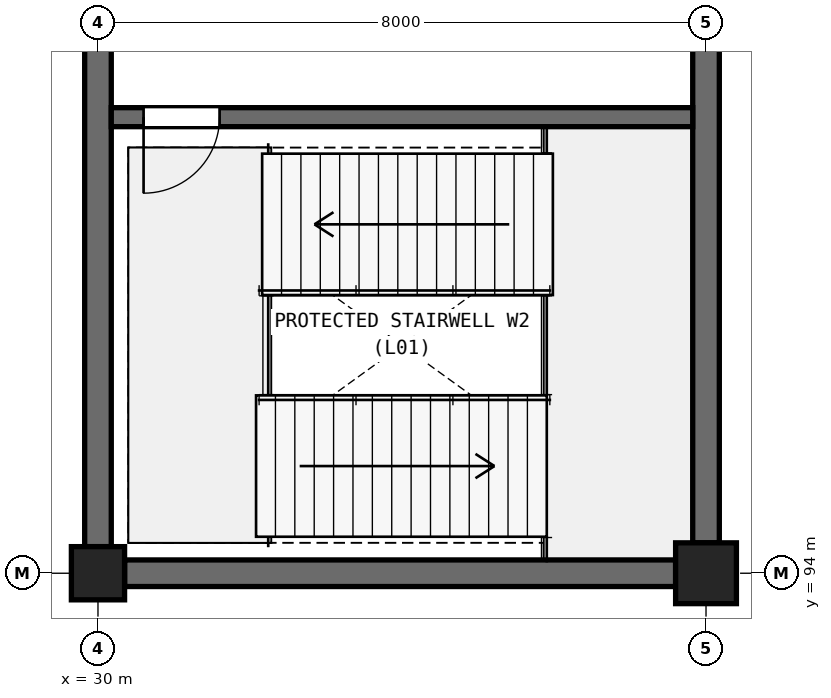
"""IFC4 building model, lengths in metres.
Left out: names, types, materials, properties, quantities, classifications, styles, units other than length and angle.
Written with IfcOpenShell. Run it as: python <this file> out.ifc"""

import sys

from ifc_helpers import new_model, si_unit, direction, frame, frame_2d, origin, origin_2d, place, context, subcontext, project, spatial, rectangle, extrude, element, fill, save


model = new_model("IFC4")
c1 = context("Model", 3, precision=1e-05, world=origin(), true_north=direction((0.0, 1.0)))
c2 = subcontext(c1, "Body", "Model", "MODEL_VIEW")
j1 = project(units=[si_unit("LENGTHUNIT", "METRE"), si_unit("PLANEANGLEUNIT", "RADIAN")], contexts=[c1])
p1 = place(None, origin())
s1 = spatial("IfcSite", under=j1, at=p1, CompositionType="ELEMENT")
p2 = place(p1, origin())
s2 = spatial("IfcBuilding", under=s1, at=p2, CompositionType="ELEMENT")
p3 = place(p2, frame((0.0, 0.0, 5.4)))
s3 = spatial("IfcBuildingStorey", under=s2, at=p3, CompositionType="ELEMENT", Elevation=5.4)
p4 = place(p3, frame((30.0, 94.0, 0.0), z_axis=(0.0, 0.0, 1.0), x_axis=(1.0, 0.0, 0.0)))
e1 = element("IfcColumn", 1, at=p4, inside=s3, PredefinedType="COLUMN", context=c2, shape_type="SweptSolid", body=[
    extrude(rectangle(XDim=0.7, YDim=0.7, at=origin_2d()), origin(), (0.0, 0.0, 1.0), 5.4),
])
p5 = place(p3, frame((38.0, 94.0, 0.0), z_axis=(0.0, 0.0, 1.0), x_axis=(1.0, 0.0, 0.0)))
e2 = element("IfcColumn", 2, at=p5, inside=s3, PredefinedType="COLUMN", context=c2, shape_type="SweptSolid", body=[
    extrude(rectangle(XDim=0.8, YDim=0.8, at=origin_2d()), origin(), (0.0, 0.0, 1.0), 5.4),
])
for number, where, z_axis, x_axis in (
    (3, (30.35, 94.0, 0.0), (0.0, 0.0, 1.0), (1.0, 0.0, 0.0)),
    (4, (30.0, 94.35, 0.0), (0.0, 0.0, 1.0), (0.0, 1.0, 0.0)),
):
    element("IfcWall", number, at=place(p3, frame(where, z_axis=z_axis, x_axis=x_axis)), inside=s3, PredefinedType="SHEAR", context=c2, shape_type="SweptSolid", body=[
        extrude(rectangle(XDim=7.25, YDim=0.35, at=frame_2d((3.625, 0.0))), origin(), (0.0, 0.0, 1.0), 5.18),
    ])
p6 = place(p3, frame((38.0, 94.4, 0.0), z_axis=(0.0, 0.0, 1.0), x_axis=(0.0, 1.0, 0.0)))
e5 = element("IfcWall", 5, at=p6, inside=s3, PredefinedType="SHEAR", context=c2, shape_type="SweptSolid", body=[
    extrude(rectangle(XDim=7.225, YDim=0.35, at=frame_2d((3.613, 0.0))), origin(), (0.0, 0.0, 1.0), 5.18),
])
p7 = place(p3, frame((30.175, 100.0, 0.0), z_axis=(0.0, 0.0, 1.0), x_axis=(1.0, 0.0, 0.0)))
e6 = element("IfcWall", 6, at=p7, inside=s3, PredefinedType="SOLIDWALL", context=c2, shape_type="SweptSolid", body=[
    extrude(rectangle(XDim=7.65, YDim=0.25, at=frame_2d((3.825, 0.0))), origin(), (0.0, 0.0, 1.0), 5.18),
])
p8 = place(p7, frame((0.425, 0.0, 0.0)))
e7 = element("IfcOpeningElement", 7, at=p8, cuts=e6, PredefinedType="OPENING", context=c2, shape_type="SweptSolid", body=[
    extrude(rectangle(XDim=1.0, YDim=2.2, at=frame_2d((0.5, 1.1))), frame((0.0, 0.135, 0.0), z_axis=(0.0, -1.0, 0.0), x_axis=(1.0, 0.0, 0.0)), (0.0, 0.0, 1.0), 0.27),
])
p9 = place(p8, frame((1.0, 0.0, 0.0), z_axis=(0.0, 0.0, 1.0), x_axis=(-1.0, 0.0, 0.0)))
e8 = element("IfcDoor", 8, at=p9, inside=s3, OperationType="SINGLE_SWING_LEFT", PredefinedType="DOOR", context=c2, shape_type="SweptSolid", body=[
    extrude(rectangle(XDim=1.0, YDim=2.2, at=frame_2d((0.5, 1.1))), frame((0.0, 0.025, 0.0), z_axis=(0.0, -1.0, 0.0), x_axis=(1.0, 0.0, 0.0)), (0.0, 0.0, 1.0), 0.05),
])
fill(e7, e8)
save(model, sys.argv[1])
